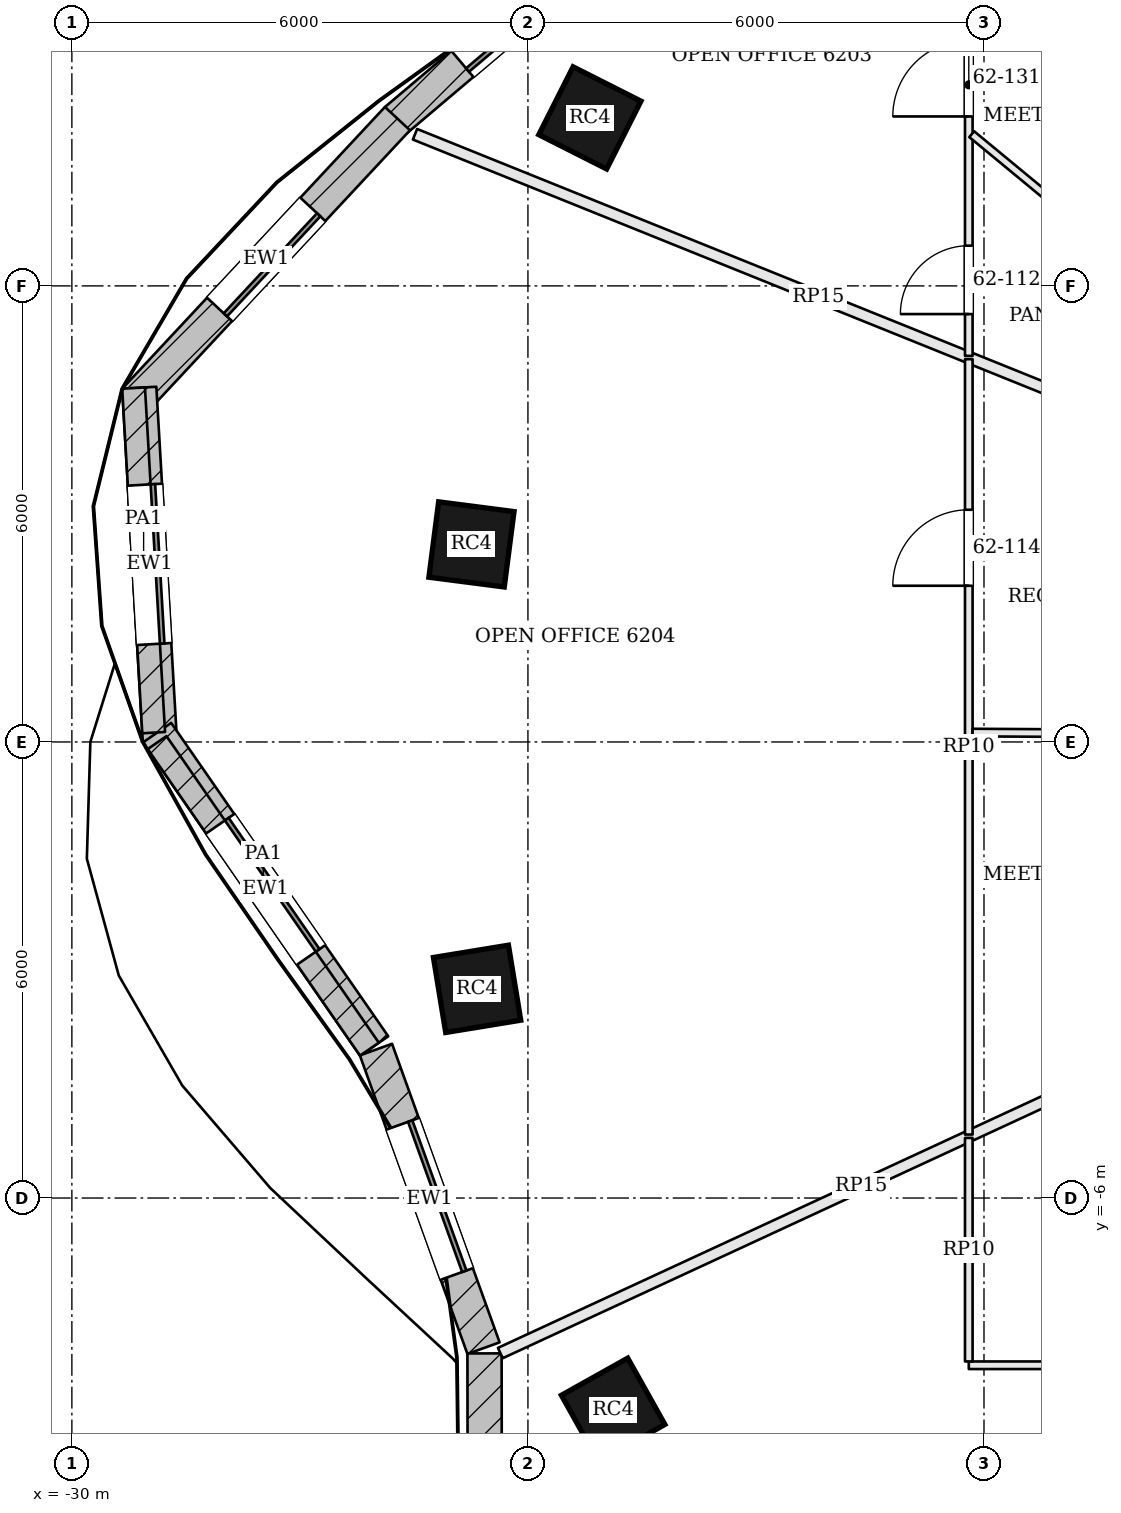
"""IFC4 building model, lengths in metres.
Left out: names, types, materials, properties, quantities, classifications, styles, units other than length and angle.
Written with IfcOpenShell. Run it as: python <this file> out.ifc"""

import sys

from ifc_helpers import new_model, si_unit, direction, frame, frame_2d, origin, origin_2d, place, context, subcontext, project, spatial, rectangle, extrude, element, fill, save


model = new_model("IFC4")
c1 = context("Model", 3, precision=1e-05, world=origin(), true_north=direction((0.0, 1.0)))
c2 = subcontext(c1, "Body", "Model", "MODEL_VIEW")
j1 = project(units=[si_unit("LENGTHUNIT", "METRE"), si_unit("PLANEANGLEUNIT", "RADIAN")], contexts=[c1])
p1 = place(None, origin())
s1 = spatial("IfcSite", under=j1, at=p1, CompositionType="ELEMENT")
p2 = place(p1, origin())
s2 = spatial("IfcBuilding", under=s1, at=p2, CompositionType="ELEMENT")
p3 = place(p2, frame((0.0, 0.0, 252.6)))
s3 = spatial("IfcBuildingStorey", under=s2, at=p3, CompositionType="ELEMENT", Elevation=252.6)
for number, where, z_axis, x_axis in (
    (1, (-23.185, 8.21, 0.0), (0.0, 0.0, 1.0), (-0.451, -0.893, 0.0)),
    (2, (-24.743, 2.599, 0.0), (0.0, 0.0, 1.0), (-0.128, -0.992, 0.0)),
    (3, (-24.669, -3.248, 0.0), (0.0, 0.0, 1.0), (0.162, -0.987, 0.0)),
    (4, (-22.879, -8.787, 0.0), (0.0, 0.0, 1.0), (0.489, -0.873, 0.0)),
):
    element("IfcColumn", number, at=place(p3, frame(where, z_axis=z_axis, x_axis=x_axis)), inside=s3, PredefinedType="COLUMN", context=c2, shape_type="SweptSolid", body=[
        extrude(rectangle(XDim=1.0, YDim=1.0, at=origin_2d()), origin(), (0.0, 0.0, 1.0), 3.9),
    ])
p4 = place(p3, frame((-22.386, 11.014, 0.0), z_axis=(0.0, 0.0, 1.0), x_axis=(-0.763569952162, -0.645725118108, 0.0)))
e5 = element("IfcWall", 5, at=p4, inside=s3, PredefinedType="SOLIDWALL", context=c2, shape_type="SweptSolid", body=[
    extrude(rectangle(XDim=4.386, YDim=0.45, at=frame_2d((2.193, 0.0))), origin(), (0.0, 0.0, 1.0), 3.7),
])
p5 = place(p4, frame((1.143, 0.0, 0.9)))
e6 = element("IfcOpeningElement", 6, at=p5, cuts=e5, PredefinedType="OPENING", context=c2, shape_type="SweptSolid", body=[
    extrude(rectangle(XDim=2.1, YDim=2.3, at=frame_2d((1.05, 1.15))), frame((0.0, 0.235, 0.0), z_axis=(0.0, -1.0, 0.0), x_axis=(1.0, 0.0, 0.0)), (0.0, 0.0, 1.0), 0.47),
])
p6 = place(p3, frame((-25.717, 8.201, 0.0), z_axis=(0.0, 0.0, 1.0), x_axis=(-0.681990073025, -0.731361429319, 0.0)))
e7 = element("IfcWall", 7, at=p6, inside=s3, PredefinedType="SOLIDWALL", context=c2, shape_type="SweptSolid", body=[
    extrude(rectangle(XDim=5.064, YDim=0.45, at=frame_2d((2.532, 0.0))), origin(), (0.0, 0.0, 1.0), 3.7),
])
p7 = place(p6, frame((1.632, 0.0, 0.9)))
e8 = element("IfcOpeningElement", 8, at=p7, cuts=e7, PredefinedType="OPENING", context=c2, shape_type="SweptSolid", body=[
    extrude(rectangle(XDim=1.8, YDim=2.3, at=frame_2d((0.9, 1.15))), frame((0.0, 0.235, 0.0), z_axis=(0.0, -1.0, 0.0), x_axis=(1.0, 0.0, 0.0)), (0.0, 0.0, 1.0), 0.47),
])
p8 = place(p3, frame((-29.113, 4.66, 0.0), z_axis=(0.0, 0.0, 1.0), x_axis=(0.058217785859, -0.998303906338, 0.0)))
e9 = element("IfcWall", 9, at=p8, inside=s3, PredefinedType="SOLIDWALL", context=c2, shape_type="SweptSolid", body=[
    extrude(rectangle(XDim=4.655, YDim=0.45, at=frame_2d((2.327, 0.0))), origin(), (0.0, 0.0, 1.0), 3.7),
])
p9 = place(p8, frame((1.277, 0.0, 0.9)))
e10 = element("IfcOpeningElement", 10, at=p9, cuts=e9, PredefinedType="OPENING", context=c2, shape_type="SweptSolid", body=[
    extrude(rectangle(XDim=2.1, YDim=2.3, at=frame_2d((1.05, 1.15))), frame((0.0, 0.235, 0.0), z_axis=(0.0, -1.0, 0.0), x_axis=(1.0, 0.0, 0.0)), (0.0, 0.0, 1.0), 0.47),
])
p10 = place(p3, frame((-28.878, 0.123, 0.0), z_axis=(0.0, 0.0, 1.0), x_axis=(0.569394732999, -0.8220642542, 0.0)))
e11 = element("IfcWall", 11, at=p10, inside=s3, PredefinedType="SOLIDWALL", context=c2, shape_type="SweptSolid", body=[
    extrude(rectangle(XDim=5.016, YDim=0.45, at=frame_2d((2.508, 0.0))), origin(), (0.0, 0.0, 1.0), 3.7),
])
p11 = place(p10, frame((1.458, 0.0, 0.9)))
e12 = element("IfcOpeningElement", 12, at=p11, cuts=e11, PredefinedType="OPENING", context=c2, shape_type="SweptSolid", body=[
    extrude(rectangle(XDim=2.1, YDim=2.3, at=frame_2d((1.05, 1.15))), frame((0.0, 0.235, 0.0), z_axis=(0.0, -1.0, 0.0), x_axis=(1.0, 0.0, 0.0)), (0.0, 0.0, 1.0), 0.47),
])
p12 = place(p3, frame((-26.0, -4.047, 0.0), z_axis=(0.0, 0.0, 1.0), x_axis=(0.338924456066, -0.940813591037, 0.0)))
e13 = element("IfcWall", 13, at=p12, inside=s3, PredefinedType="SOLIDWALL", context=c2, shape_type="SweptSolid", body=[
    extrude(rectangle(XDim=4.175, YDim=0.45, at=frame_2d((2.087, 0.0))), origin(), (0.0, 0.0, 1.0), 3.7),
])
p13 = place(p12, frame((1.038, 0.0, 0.9)))
e14 = element("IfcOpeningElement", 14, at=p13, cuts=e13, PredefinedType="OPENING", context=c2, shape_type="SweptSolid", body=[
    extrude(rectangle(XDim=2.1, YDim=2.3, at=frame_2d((1.05, 1.15))), frame((0.0, 0.235, 0.0), z_axis=(0.0, -1.0, 0.0), x_axis=(1.0, 0.0, 0.0)), (0.0, 0.0, 1.0), 0.47),
])
p14 = place(p3, frame((-24.571, -8.044, 0.0), z_axis=(0.0, 0.0, 1.0), x_axis=(0.001546005189, -0.999998804933, 0.0)))
e15 = element("IfcWall", 15, at=p14, inside=s3, PredefinedType="SOLIDWALL", context=c2, shape_type="SweptSolid", body=[
    extrude(rectangle(XDim=4.58, YDim=0.45, at=frame_2d((2.29, 0.0))), origin(), (0.0, 0.0, 1.0), 3.7),
])
p15 = place(p14, frame((1.24, 0.0, 0.9)))
e16 = element("IfcOpeningElement", 16, at=p15, cuts=e15, PredefinedType="OPENING", context=c2, shape_type="SweptSolid", body=[
    extrude(rectangle(XDim=2.1, YDim=2.3, at=frame_2d((1.05, 1.15))), frame((0.0, 0.235, 0.0), z_axis=(0.0, -1.0, 0.0), x_axis=(1.0, 0.0, 0.0)), (0.0, 0.0, 1.0), 0.47),
])
p16 = place(p3, frame((-29.188, 4.656, 3.9), z_axis=(0.0, 0.0, 1.0), x_axis=(0.058230319325, -0.998303175349, 0.0)))
e17 = element("IfcWall", 17, at=p16, inside=s3, PredefinedType="PARAPET", context=c2, shape_type="SweptSolid", body=[
    extrude(rectangle(XDim=4.541, YDim=0.3, at=frame_2d((2.271, 0.0))), origin(), (0.0, 0.0, 1.0), 1.1),
])
p17 = place(p3, frame((-28.879, -0.009, 3.9), z_axis=(0.0, 0.0, 1.0), x_axis=(0.569370412902, -0.822081098744, 0.0)))
e18 = element("IfcWall", 18, at=p17, inside=s3, PredefinedType="PARAPET", context=c2, shape_type="SweptSolid", body=[
    extrude(rectangle(XDim=4.906, YDim=0.3, at=frame_2d((2.453, 0.0))), origin(), (0.0, 0.0, 1.0), 1.1),
])
p18 = place(p3, frame((-25.486, 7.995, 0.0), z_axis=(0.0, 0.0, 1.0), x_axis=(0.927462708684, -0.373915664289, 0.0)))
e19 = element("IfcWall", 19, at=p18, inside=s3, PredefinedType="PARTITIONING", context=c2, shape_type="SweptSolid", body=[
    extrude(rectangle(XDim=11.447, YDim=0.15, at=frame_2d((5.723, 0.0))), origin(), (0.0, 0.0, 1.0), 3.084),
])
p19 = place(p3, frame((-24.363, -8.04, 0.0), z_axis=(0.0, 0.0, 1.0), x_axis=(0.907507429398, 0.420036028916, 0.0)))
e20 = element("IfcWall", 20, at=p19, inside=s3, PredefinedType="PARTITIONING", context=c2, shape_type="SweptSolid", body=[
    extrude(rectangle(XDim=10.463, YDim=0.15, at=frame_2d((5.231, 0.0))), origin(), (0.0, 0.0, 1.0), 3.084),
])
p20 = place(p3, frame((-18.2, 5.079, 0.0), z_axis=(0.0, 0.0, 1.0), x_axis=(0.0, 1.0, 0.0)))
e21 = element("IfcWall", 21, at=p20, inside=s3, PredefinedType="PARTITIONING", context=c2, shape_type="SweptSolid", body=[
    extrude(rectangle(XDim=7.132, YDim=0.1, at=frame_2d((3.566, 0.0))), origin(), (0.0, 0.0, 1.0), 3.084),
])
p21 = place(p20, frame((0.55, 0.0, 0.0)))
e22 = element("IfcOpeningElement", 22, at=p21, cuts=e21, PredefinedType="OPENING", context=c2, shape_type="SweptSolid", body=[
    extrude(rectangle(XDim=0.9, YDim=2.1, at=frame_2d((0.45, 1.05))), frame((0.0, 0.06, 0.0), z_axis=(0.0, -1.0, 0.0), x_axis=(1.0, 0.0, 0.0)), (0.0, 0.0, 1.0), 0.12),
])
p22 = place(p20, frame((3.15, 0.0, 0.0)))
e23 = element("IfcOpeningElement", 23, at=p22, cuts=e21, PredefinedType="OPENING", context=c2, shape_type="SweptSolid", body=[
    extrude(rectangle(XDim=1.0, YDim=2.4, at=frame_2d((0.5, 1.2))), frame((0.0, 0.06, 0.0), z_axis=(0.0, -1.0, 0.0), x_axis=(1.0, 0.0, 0.0)), (0.0, 0.0, 1.0), 0.12),
])
p23 = place(p3, frame((-14.847, 7.864, 0.0), z_axis=(0.0, 0.0, 1.0), x_axis=(-0.62137054643, 0.783516843488, 0.0)))
e24 = element("IfcWall", 24, at=p23, inside=s3, PredefinedType="PARTITIONING", context=c2, shape_type="SweptSolid", body=[
    extrude(rectangle(XDim=5.347, YDim=0.1, at=frame_2d((2.673, 0.0))), origin(), (0.0, 0.0, 1.0), 3.084),
])
p24 = place(p3, frame((-14.858, 5.268, 0.0), z_axis=(0.0, 0.0, 1.0), x_axis=(-0.771123538213, 0.636685549399, 0.0)))
e25 = element("IfcWall", 25, at=p24, inside=s3, PredefinedType="PARTITIONING", context=c2, shape_type="SweptSolid", body=[
    extrude(rectangle(XDim=4.284, YDim=0.1, at=frame_2d((2.142, 0.0))), origin(), (0.0, 0.0, 1.0), 3.084),
])
p25 = place(p3, frame((-18.2, -5.165, 0.0), z_axis=(0.0, 0.0, 1.0), x_axis=(0.0, 1.0, 0.0)))
e26 = element("IfcWall", 26, at=p25, inside=s3, PredefinedType="PARTITIONING", context=c2, shape_type="SweptSolid", body=[
    extrude(rectangle(XDim=10.201, YDim=0.1, at=frame_2d((5.1, 0.0))), origin(), (0.0, 0.0, 1.0), 3.084),
])
p26 = place(p25, frame((7.22, 0.0, 0.0)))
e27 = element("IfcOpeningElement", 27, at=p26, cuts=e26, PredefinedType="OPENING", context=c2, shape_type="SweptSolid", body=[
    extrude(rectangle(XDim=1.0, YDim=2.1, at=frame_2d((0.5, 1.05))), frame((0.0, 0.06, 0.0), z_axis=(0.0, -1.0, 0.0), x_axis=(1.0, 0.0, 0.0)), (0.0, 0.0, 1.0), 0.12),
])
p27 = place(p3, frame((-14.875, 0.104, 0.0), z_axis=(0.0, 0.0, 1.0), x_axis=(-0.999982216314, 0.005963812234, 0.0)))
e28 = element("IfcWall", 28, at=p27, inside=s3, PredefinedType="PARTITIONING", context=c2, shape_type="SweptSolid", body=[
    extrude(rectangle(XDim=3.275, YDim=0.1, at=frame_2d((1.637, 0.0))), origin(), (0.0, 0.0, 1.0), 3.084),
])
p28 = place(p3, frame((-11.734, -8.2, 0.0), z_axis=(0.0, 0.0, 1.0), x_axis=(-1.0, 0.0, 0.0)))
e29 = element("IfcWall", 29, at=p28, inside=s3, PredefinedType="PARTITIONING", context=c2, shape_type="SweptSolid", body=[
    extrude(rectangle(XDim=6.466, YDim=0.1, at=frame_2d((3.233, 0.0))), origin(), (0.0, 0.0, 1.0), 3.084),
])
p29 = place(p28, frame((4.233, 0.0, 0.0)))
e30 = element("IfcOpeningElement", 30, at=p29, cuts=e29, PredefinedType="OPENING", context=c2, shape_type="SweptSolid", body=[
    extrude(rectangle(XDim=1.0, YDim=2.1, at=frame_2d((0.5, 1.05))), frame((0.0, 0.06, 0.0), z_axis=(0.0, -1.0, 0.0), x_axis=(1.0, 0.0, 0.0)), (0.0, 0.0, 1.0), 0.12),
])
p30 = place(p3, frame((-18.2, -8.15, 0.0), z_axis=(0.0, 0.0, 1.0), x_axis=(0.0, 1.0, 0.0)))
e31 = element("IfcWall", 31, at=p30, inside=s3, PredefinedType="PARTITIONING", context=c2, shape_type="SweptSolid", body=[
    extrude(rectangle(XDim=2.941, YDim=0.1, at=frame_2d((1.47, 0.0))), origin(), (0.0, 0.0, 1.0), 3.084),
])
p31 = place(p5, origin())
e32 = element("IfcWindow", 32, at=p31, inside=s3, PartitioningType="SINGLE_PANEL", PredefinedType="WINDOW", context=c2, shape_type="SweptSolid", body=[
    extrude(rectangle(XDim=2.1, YDim=2.3, at=frame_2d((1.05, 1.15))), frame((0.0, 0.135, 0.0), z_axis=(0.0, -1.0, 0.0), x_axis=(1.0, 0.0, 0.0)), (0.0, 0.0, 1.0), 0.06),
])
fill(e6, e32)
p32 = place(p7, origin())
e33 = element("IfcWindow", 33, at=p32, inside=s3, PartitioningType="SINGLE_PANEL", PredefinedType="WINDOW", context=c2, shape_type="SweptSolid", body=[
    extrude(rectangle(XDim=1.8, YDim=2.3, at=frame_2d((0.9, 1.15))), frame((0.0, 0.135, 0.0), z_axis=(0.0, -1.0, 0.0), x_axis=(1.0, 0.0, 0.0)), (0.0, 0.0, 1.0), 0.06),
])
fill(e8, e33)
p33 = place(p9, origin())
e34 = element("IfcWindow", 34, at=p33, inside=s3, PartitioningType="SINGLE_PANEL", PredefinedType="WINDOW", context=c2, shape_type="SweptSolid", body=[
    extrude(rectangle(XDim=2.1, YDim=2.3, at=frame_2d((1.05, 1.15))), frame((0.0, 0.135, 0.0), z_axis=(0.0, -1.0, 0.0), x_axis=(1.0, 0.0, 0.0)), (0.0, 0.0, 1.0), 0.06),
])
fill(e10, e34)
p34 = place(p11, origin())
e35 = element("IfcWindow", 35, at=p34, inside=s3, PartitioningType="SINGLE_PANEL", PredefinedType="WINDOW", context=c2, shape_type="SweptSolid", body=[
    extrude(rectangle(XDim=2.1, YDim=2.3, at=frame_2d((1.05, 1.15))), frame((0.0, 0.135, 0.0), z_axis=(0.0, -1.0, 0.0), x_axis=(1.0, 0.0, 0.0)), (0.0, 0.0, 1.0), 0.06),
])
fill(e12, e35)
p35 = place(p13, origin())
e36 = element("IfcWindow", 36, at=p35, inside=s3, PartitioningType="SINGLE_PANEL", PredefinedType="WINDOW", context=c2, shape_type="SweptSolid", body=[
    extrude(rectangle(XDim=2.1, YDim=2.3, at=frame_2d((1.05, 1.15))), frame((0.0, 0.135, 0.0), z_axis=(0.0, -1.0, 0.0), x_axis=(1.0, 0.0, 0.0)), (0.0, 0.0, 1.0), 0.06),
])
fill(e14, e36)
p36 = place(p21, origin())
e37 = element("IfcDoor", 37, at=p36, inside=s3, OperationType="SINGLE_SWING_LEFT", PredefinedType="DOOR", context=c2, shape_type="SweptSolid", body=[
    extrude(rectangle(XDim=0.9, YDim=2.1, at=frame_2d((0.45, 1.05))), frame((0.0, 0.025, 0.0), z_axis=(0.0, -1.0, 0.0), x_axis=(1.0, 0.0, 0.0)), (0.0, 0.0, 1.0), 0.05),
])
fill(e22, e37)
p37 = place(p26, origin())
e38 = element("IfcDoor", 38, at=p37, inside=s3, OperationType="SINGLE_SWING_LEFT", PredefinedType="DOOR", context=c2, shape_type="SweptSolid", body=[
    extrude(rectangle(XDim=1.0, YDim=2.1, at=frame_2d((0.5, 1.05))), frame((0.0, 0.025, 0.0), z_axis=(0.0, -1.0, 0.0), x_axis=(1.0, 0.0, 0.0)), (0.0, 0.0, 1.0), 0.05),
])
fill(e27, e38)
p38 = place(p22, origin())
e39 = element("IfcDoor", 39, at=p38, inside=s3, OperationType="SINGLE_SWING_LEFT", PredefinedType="DOOR", context=c2, shape_type="SweptSolid", body=[
    extrude(rectangle(XDim=1.0, YDim=2.4, at=frame_2d((0.5, 1.2))), frame((0.0, 0.025, 0.0), z_axis=(0.0, -1.0, 0.0), x_axis=(1.0, 0.0, 0.0)), (0.0, 0.0, 1.0), 0.05),
])
fill(e23, e39)
save(model, sys.argv[1])
